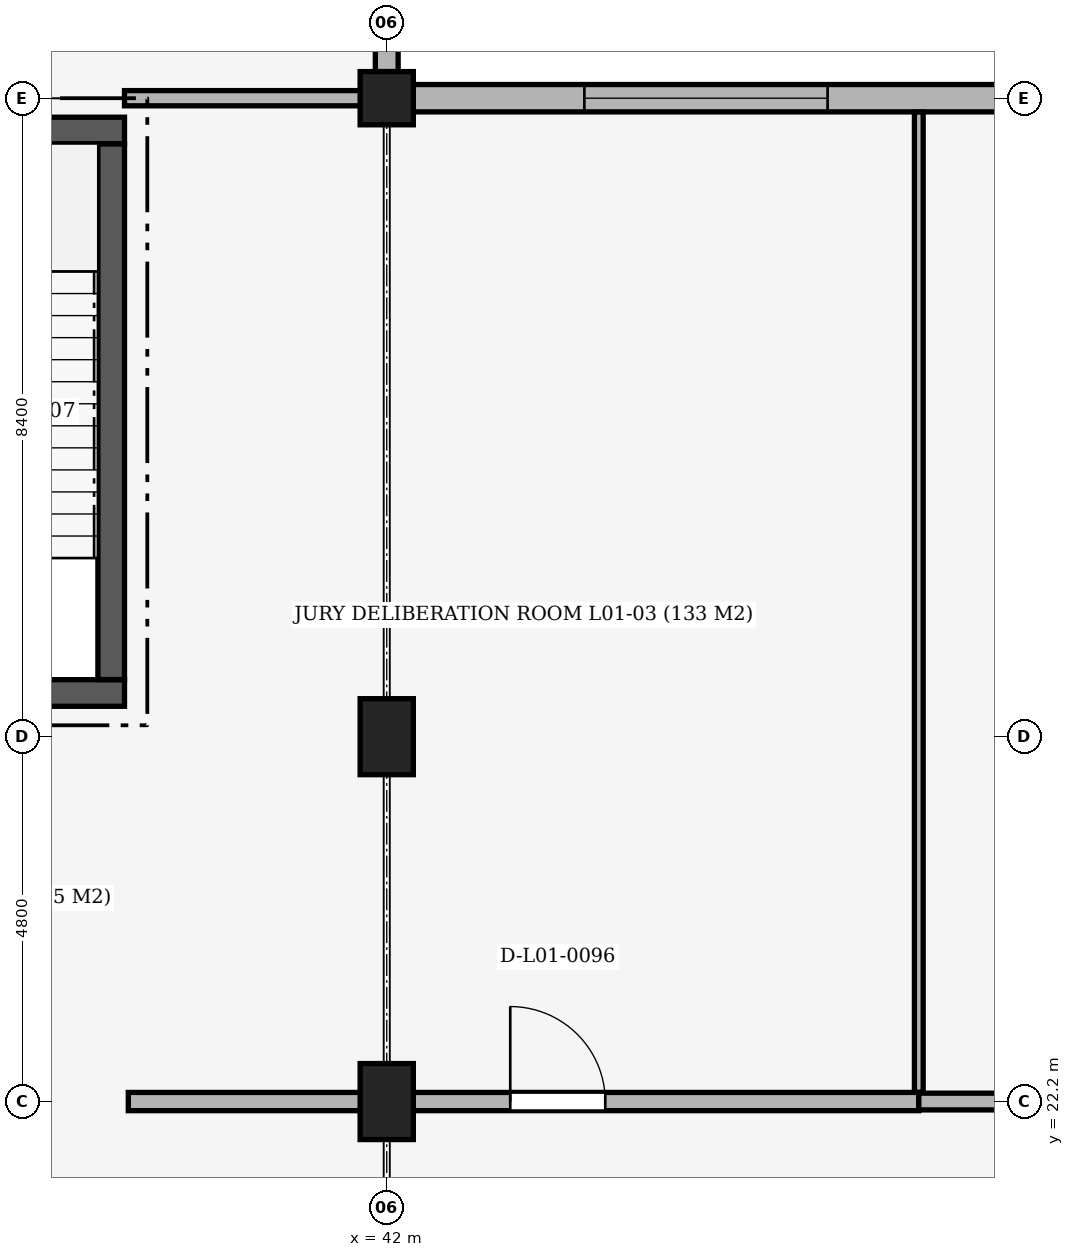
"""IFC4 building model, lengths in metres.
Left out: names, types, materials, properties, quantities, classifications, styles, units other than length and angle.
Written with IfcOpenShell. Run it as: python <this file> out.ifc"""

import sys

from ifc_helpers import new_model, si_unit, direction, frame, frame_2d, origin, origin_2d, place, context, subcontext, project, spatial, rectangle, extrude, element, fill, save


model = new_model("IFC4")
c1 = context("Model", 3, precision=1e-05, world=origin(), true_north=direction((0.0, 1.0)))
c2 = subcontext(c1, "Body", "Model", "MODEL_VIEW")
j1 = project(units=[si_unit("LENGTHUNIT", "METRE"), si_unit("PLANEANGLEUNIT", "RADIAN")], contexts=[c1])
p1 = place(None, origin())
s1 = spatial("IfcSite", under=j1, at=p1, CompositionType="ELEMENT")
p2 = place(p1, origin())
s2 = spatial("IfcBuilding", under=s1, at=p2, CompositionType="ELEMENT")
p3 = place(p2, frame((0.0, 0.0, 5.1)))
s3 = spatial("IfcBuildingStorey", under=s2, at=p3, CompositionType="ELEMENT", Elevation=5.1)
for number, where, z_axis, x_axis in (
    (1, (42.0, 22.2, 0.0), (0.0, 0.0, 1.0), (1.0, 0.0, 0.0)),
    (2, (42.0, 27.0, 0.0), (0.0, 0.0, 1.0), (1.0, 0.0, 0.0)),
):
    element("IfcColumn", number, at=place(p3, frame(where, z_axis=z_axis, x_axis=x_axis)), inside=s3, PredefinedType="COLUMN", context=c2, shape_type="SweptSolid", body=[
        extrude(rectangle(XDim=0.7, YDim=1.0, at=origin_2d()), origin(), (0.0, 0.0, 1.0), 5.1),
    ])
p4 = place(p3, frame((42.0, 35.4, 0.0), z_axis=(0.0, 0.0, 1.0), x_axis=(1.0, 0.0, 0.0)))
e3 = element("IfcColumn", 3, at=p4, inside=s3, PredefinedType="COLUMN", context=c2, shape_type="SweptSolid", body=[
    extrude(rectangle(XDim=0.7, YDim=0.7, at=origin_2d()), origin(), (0.0, 0.0, 1.0), 5.1),
])
p5 = place(p3, frame((42.0, 40.525, 0.0), z_axis=(0.0, 0.0, 1.0), x_axis=(0.0, -1.0, 0.0)))
e4 = element("IfcWall", 4, at=p5, inside=s3, PredefinedType="SOLIDWALL", context=c2, shape_type="SweptSolid", body=[
    extrude(rectangle(XDim=4.775, YDim=0.3, at=frame_2d((2.387, 0.0))), origin(), (0.0, 0.0, 1.0), 4.37),
])
p6 = place(p3, frame((42.35, 35.4, 0.0), z_axis=(0.0, 0.0, 1.0), x_axis=(1.0, 0.0, 0.0)))
e5 = element("IfcWall", 5, at=p6, inside=s3, PredefinedType="SOLIDWALL", context=c2, shape_type="SweptSolid", body=[
    extrude(rectangle(XDim=7.7, YDim=0.36, at=frame_2d((3.85, 0.0))), origin(), (0.0, 0.0, 1.0), 4.07),
])
p7 = place(p6, frame((2.25, 0.0, 0.75)))
e6 = element("IfcOpeningElement", 6, at=p7, cuts=e5, PredefinedType="OPENING", context=c2, shape_type="SweptSolid", body=[
    extrude(rectangle(XDim=3.2, YDim=2.6, at=frame_2d((1.6, 1.3))), frame((0.0, 0.195, 0.0), z_axis=(0.0, -1.0, 0.0), x_axis=(1.0, 0.0, 0.0)), (0.0, 0.0, 1.0), 0.39),
])
p8 = place(p3, frame((33.939, 34.975, 0.0), z_axis=(0.0, 0.0, 1.0), x_axis=(1.0, 0.0, 0.0)))
e7 = element("IfcWall", 7, at=p8, inside=s3, PredefinedType="SHEAR", context=c2, shape_type="SweptSolid", body=[
    extrude(rectangle(XDim=4.611, YDim=0.35, at=frame_2d((2.306, 0.0))), origin(), (0.0, 0.0, 1.0), 4.82),
])
p9 = place(p3, frame((33.939, 27.575, 0.0), z_axis=(0.0, 0.0, 1.0), x_axis=(1.0, 0.0, 0.0)))
e8 = element("IfcWall", 8, at=p9, inside=s3, PredefinedType="SHEAR", context=c2, shape_type="SweptSolid", body=[
    extrude(rectangle(XDim=4.611, YDim=0.35, at=frame_2d((2.306, 0.0))), origin(), (0.0, 0.0, 1.0), 4.82),
])
p10 = place(p9, frame((1.961, 0.0, 0.0)))
e9 = element("IfcOpeningElement", 9, at=p10, cuts=e8, PredefinedType="OPENING", context=c2, shape_type="SweptSolid", body=[
    extrude(rectangle(XDim=1.2, YDim=2.2, at=frame_2d((0.6, 1.1))), frame((0.0, 0.19, 0.0), z_axis=(0.0, -1.0, 0.0), x_axis=(1.0, 0.0, 0.0)), (0.0, 0.0, 1.0), 0.38),
])
p11 = place(p3, frame((38.375, 27.752, 0.0), z_axis=(0.0, 0.0, 1.0), x_axis=(0.0, 1.0, 0.0)))
e10 = element("IfcWall", 10, at=p11, inside=s3, PredefinedType="SHEAR", context=c2, shape_type="SweptSolid", body=[
    extrude(rectangle(XDim=7.046, YDim=0.35, at=frame_2d((3.523, 0.0))), origin(), (0.0, 0.0, 1.0), 4.82),
])
p12 = place(p3, frame((38.6, 22.2, 0.0), z_axis=(0.0, 0.0, 1.0), x_axis=(1.0, 0.0, 0.0)))
e11 = element("IfcWall", 11, at=p12, inside=s3, PredefinedType="PARTITIONING", context=c2, shape_type="SweptSolid", body=[
    extrude(rectangle(XDim=10.4, YDim=0.24, at=frame_2d((5.2, 0.0))), origin(), (0.0, 0.0, 1.0), 4.07),
])
p13 = place(p12, frame((5.025, 0.0, 0.0)))
e12 = element("IfcOpeningElement", 12, at=p13, cuts=e11, PredefinedType="OPENING", context=c2, shape_type="SweptSolid", body=[
    extrude(rectangle(XDim=1.25, YDim=2.2, at=frame_2d((0.625, 1.1))), frame((0.0, 0.135, 0.0), z_axis=(0.0, -1.0, 0.0), x_axis=(1.0, 0.0, 0.0)), (0.0, 0.0, 1.0), 0.27),
])
p14 = place(p3, frame((49.0, 22.2, 0.0), z_axis=(0.0, 0.0, 1.0), x_axis=(1.0, 0.0, 0.0)))
e13 = element("IfcWall", 13, at=p14, inside=s3, PredefinedType="PARTITIONING", context=c2, shape_type="SweptSolid", body=[
    extrude(rectangle(XDim=10.3, YDim=0.22, at=frame_2d((5.15, 0.0))), origin(), (0.0, 0.0, 1.0), 4.07),
])
p15 = place(p14, frame((4.425, 0.0, 0.0)))
e14 = element("IfcOpeningElement", 14, at=p15, cuts=e13, PredefinedType="OPENING", context=c2, shape_type="SweptSolid", body=[
    extrude(rectangle(XDim=1.45, YDim=2.25, at=frame_2d((0.725, 1.125))), frame((0.0, 0.125, 0.0), z_axis=(0.0, -1.0, 0.0), x_axis=(1.0, 0.0, 0.0)), (0.0, 0.0, 1.0), 0.25),
])
p16 = place(p3, frame((38.55, 35.4, 0.0), z_axis=(0.0, 0.0, 1.0), x_axis=(1.0, 0.0, 0.0)))
e15 = element("IfcWall", 15, at=p16, inside=s3, PredefinedType="PARTITIONING", context=c2, shape_type="SweptSolid", body=[
    extrude(rectangle(XDim=3.415, YDim=0.2, at=frame_2d((1.708, 0.0))), origin(), (0.0, 0.0, 1.0), 4.07),
])
p17 = place(p3, frame((49.0, 22.322, 0.0), z_axis=(0.0, 0.0, 1.0), x_axis=(0.0, 1.0, 0.0)))
e16 = element("IfcWall", 16, at=p17, inside=s3, PredefinedType="PARTITIONING", context=c2, shape_type="SweptSolid", body=[
    extrude(rectangle(XDim=12.896, YDim=0.115, at=frame_2d((6.448, 0.0))), origin(), (0.0, 0.0, 1.0), 4.07),
])
p18 = place(p7, origin())
e17 = element("IfcWindow", 17, at=p18, inside=s3, PartitioningType="SINGLE_PANEL", PredefinedType="WINDOW", context=c2, shape_type="SweptSolid", body=[
    extrude(rectangle(XDim=3.2, YDim=2.6, at=frame_2d((1.6, 1.3))), frame((0.0, 0.03, 0.0), z_axis=(0.0, -1.0, 0.0), x_axis=(1.0, 0.0, 0.0)), (0.0, 0.0, 1.0), 0.06),
])
fill(e6, e17)
p19 = place(p13, origin())
e18 = element("IfcDoor", 18, at=p19, inside=s3, OperationType="SINGLE_SWING_LEFT", PredefinedType="DOOR", context=c2, shape_type="SweptSolid", body=[
    extrude(rectangle(XDim=1.25, YDim=2.2, at=frame_2d((0.625, 1.1))), frame((0.0, 0.025, 0.0), z_axis=(0.0, -1.0, 0.0), x_axis=(1.0, 0.0, 0.0)), (0.0, 0.0, 1.0), 0.05),
])
fill(e12, e18)
save(model, sys.argv[1])
